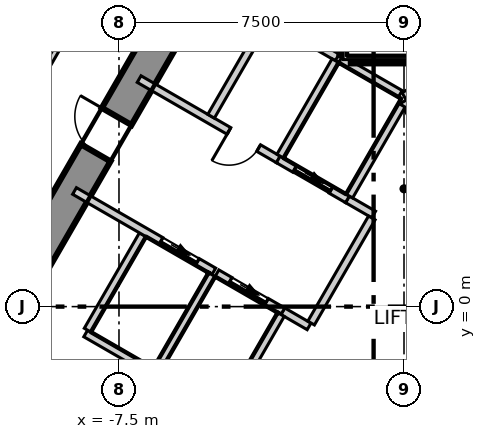
"""IFC4 building model, lengths in metres.
Left out: names, types, materials, properties, quantities, classifications, styles, units other than length and angle.
Written with IfcOpenShell. Run it as: python <this file> out.ifc"""

import sys

from ifc_helpers import new_model, si_unit, direction, frame, frame_2d, origin, place, context, subcontext, project, spatial, polyline, rectangle, outline, extrude, element, fill, save


model = new_model("IFC4")
c1 = context("Model", 3, precision=1e-05, world=origin(), true_north=direction((0.0, 1.0)))
c2 = subcontext(c1, "Body", "Model", "MODEL_VIEW")
j1 = project(units=[si_unit("LENGTHUNIT", "METRE"), si_unit("PLANEANGLEUNIT", "RADIAN")], contexts=[c1])
p1 = place(None, origin())
s1 = spatial("IfcSite", under=j1, at=p1, CompositionType="ELEMENT")
p2 = place(p1, origin())
s2 = spatial("IfcBuilding", under=s1, at=p2, CompositionType="ELEMENT")
p3 = place(p2, frame((0.0, 0.0, 71.3)))
s3 = spatial("IfcBuildingStorey", under=s2, at=p3, CompositionType="ELEMENT", Elevation=71.3)
p4 = place(p3, frame((-1.645, 15.25, -0.3), z_axis=(0.0, 0.0, 1.0), x_axis=(-0.500026485275, -0.866010111964, 0.0)))
e1 = element("IfcWall", 1, at=p4, inside=s3, PredefinedType="SHEAR", context=c2, shape_type="SweptSolid", body=[
    extrude(outline(polyline([(-0.26, -0.45), (1.685, -0.45), (3.63, -0.45), (5.576, -0.45), (7.521, -0.45), (9.466, -0.449), (11.411, -0.449), (13.357, -0.449), (15.302, -0.449), (17.247, -0.449), (19.192, -0.449), (21.138, -0.449), (23.083, -0.449), (25.028, -0.449), (24.509, 0.45), (22.644, 0.45), (20.778, 0.45), (18.913, 0.45), (17.048, 0.45), (15.182, 0.449), (13.317, 0.449), (11.452, 0.449), (9.587, 0.449), (7.721, 0.449), (5.856, 0.449), (3.991, 0.449), (2.125, 0.449), (0.26, 0.449), (-0.26, -0.45)])), origin(), (0.0, 0.0, 1.0), 4.0),
])
p5 = place(p4, frame((11.834, 0.0, 0.3)))
e2 = element("IfcOpeningElement", 2, at=p5, cuts=e1, PredefinedType="OPENING", context=c2, shape_type="SweptSolid", body=[
    extrude(rectangle(XDim=1.1, YDim=2.1, at=frame_2d((0.55, 1.05))), frame((0.0, 0.46, 0.0), z_axis=(0.0, -1.0, 0.0), x_axis=(1.0, 0.0, 0.0)), (0.0, 0.0, 1.0), 0.92),
])
p6 = place(p4, frame((8.13, 0.0, 0.3)))
e3 = element("IfcOpeningElement", 3, at=p6, cuts=e1, PredefinedType="OPENING", context=c2, shape_type="SweptSolid", body=[
    extrude(rectangle(XDim=0.9, YDim=2.1, at=frame_2d((0.45, 1.05))), frame((0.0, 0.46, 0.0), z_axis=(0.0, -1.0, 0.0), x_axis=(1.0, 0.0, 0.0)), (0.0, 0.0, 1.0), 0.92),
])
p7 = place(p4, frame((3.255, 0.0, 0.3)))
e4 = element("IfcOpeningElement", 4, at=p7, cuts=e1, PredefinedType="OPENING", context=c2, shape_type="SweptSolid", body=[
    extrude(rectangle(XDim=0.9, YDim=2.1, at=frame_2d((0.45, 1.05))), frame((0.0, 0.46, 0.0), z_axis=(0.0, -1.0, 0.0), x_axis=(1.0, 0.0, 0.0)), (0.0, 0.0, 1.0), 0.92),
])
p8 = place(p3, frame((-3.326, 37.084, 0.0), z_axis=(0.0, 0.0, 1.0), x_axis=(-0.500000131003, -0.86602532815, 0.0)))
e5 = element("IfcWall", 5, at=p8, inside=s3, PredefinedType="ELEMENTEDWALL", context=c2, shape_type="SweptSolid", body=[
    extrude(rectangle(XDim=60.886, YDim=0.2, at=frame_2d((30.443, 0.0))), origin(), (0.0, 0.0, 1.0), 3.7),
])
p9 = place(p8, frame((2.146, 0.0, 0.9)))
e6 = element("IfcOpeningElement", 6, at=p9, cuts=e5, PredefinedType="OPENING", context=c2, shape_type="SweptSolid", body=[
    extrude(rectangle(XDim=5.6, YDim=2.5, at=frame_2d((2.8, 1.25))), frame((0.0, 0.11, 0.0), z_axis=(0.0, -1.0, 0.0), x_axis=(1.0, 0.0, 0.0)), (0.0, 0.0, 1.0), 0.22),
])
p10 = place(p8, frame((9.434, 0.0, 0.9)))
e7 = element("IfcOpeningElement", 7, at=p10, cuts=e5, PredefinedType="OPENING", context=c2, shape_type="SweptSolid", body=[
    extrude(rectangle(XDim=5.6, YDim=2.5, at=frame_2d((2.8, 1.25))), frame((0.0, 0.11, 0.0), z_axis=(0.0, -1.0, 0.0), x_axis=(1.0, 0.0, 0.0)), (0.0, 0.0, 1.0), 0.22),
])
p11 = place(p8, frame((16.721, 0.0, 0.9)))
e8 = element("IfcOpeningElement", 8, at=p11, cuts=e5, PredefinedType="OPENING", context=c2, shape_type="SweptSolid", body=[
    extrude(rectangle(XDim=5.6, YDim=2.5, at=frame_2d((2.8, 1.25))), frame((0.0, 0.11, 0.0), z_axis=(0.0, -1.0, 0.0), x_axis=(1.0, 0.0, 0.0)), (0.0, 0.0, 1.0), 0.22),
])
p12 = place(p8, frame((24.009, 0.0, 0.9)))
e9 = element("IfcOpeningElement", 9, at=p12, cuts=e5, PredefinedType="OPENING", context=c2, shape_type="SweptSolid", body=[
    extrude(rectangle(XDim=5.6, YDim=2.5, at=frame_2d((2.8, 1.25))), frame((0.0, 0.11, 0.0), z_axis=(0.0, -1.0, 0.0), x_axis=(1.0, 0.0, 0.0)), (0.0, 0.0, 1.0), 0.22),
])
p13 = place(p8, frame((31.297, 0.0, 0.9)))
e10 = element("IfcOpeningElement", 10, at=p13, cuts=e5, PredefinedType="OPENING", context=c2, shape_type="SweptSolid", body=[
    extrude(rectangle(XDim=5.6, YDim=2.5, at=frame_2d((2.8, 1.25))), frame((0.0, 0.11, 0.0), z_axis=(0.0, -1.0, 0.0), x_axis=(1.0, 0.0, 0.0)), (0.0, 0.0, 1.0), 0.22),
])
p14 = place(p8, frame((38.584, 0.0, 0.9)))
e11 = element("IfcOpeningElement", 11, at=p14, cuts=e5, PredefinedType="OPENING", context=c2, shape_type="SweptSolid", body=[
    extrude(rectangle(XDim=5.6, YDim=2.5, at=frame_2d((2.8, 1.25))), frame((0.0, 0.11, 0.0), z_axis=(0.0, -1.0, 0.0), x_axis=(1.0, 0.0, 0.0)), (0.0, 0.0, 1.0), 0.22),
])
p15 = place(p8, frame((45.872, 0.0, 0.9)))
e12 = element("IfcOpeningElement", 12, at=p15, cuts=e5, PredefinedType="OPENING", context=c2, shape_type="SweptSolid", body=[
    extrude(rectangle(XDim=5.6, YDim=2.5, at=frame_2d((2.8, 1.25))), frame((0.0, 0.11, 0.0), z_axis=(0.0, -1.0, 0.0), x_axis=(1.0, 0.0, 0.0)), (0.0, 0.0, 1.0), 0.22),
])
p16 = place(p8, frame((53.159, 0.0, 0.9)))
e13 = element("IfcOpeningElement", 13, at=p16, cuts=e5, PredefinedType="OPENING", context=c2, shape_type="SweptSolid", body=[
    extrude(rectangle(XDim=5.6, YDim=2.5, at=frame_2d((2.8, 1.25))), frame((0.0, 0.11, 0.0), z_axis=(0.0, -1.0, 0.0), x_axis=(1.0, 0.0, 0.0)), (0.0, 0.0, 1.0), 0.22),
])
p17 = place(p3, frame((-19.497, -11.17, 0.0), z_axis=(0.0, 0.0, 1.0), x_axis=(0.499998854553, 0.866026065108, 0.0)))
e14 = element("IfcWall", 14, at=p17, inside=s3, PredefinedType="PARTITIONING", context=c2, shape_type="SweptSolid", body=[
    extrude(rectangle(XDim=38.994, YDim=0.15, at=frame_2d((19.497, 0.0))), origin(), (0.0, 0.0, 1.0), 3.7),
])
p18 = place(p17, frame((35.944, 0.0, 0.0)))
e15 = element("IfcOpeningElement", 15, at=p18, cuts=e14, PredefinedType="OPENING", context=c2, shape_type="SweptSolid", body=[
    extrude(rectangle(XDim=1.1, YDim=2.1, at=frame_2d((0.55, 1.05))), frame((0.0, 0.085, 0.0), z_axis=(0.0, -1.0, 0.0), x_axis=(1.0, 0.0, 0.0)), (0.0, 0.0, 1.0), 0.17),
])
p19 = place(p17, frame((26.148, 0.0, 0.0)))
e16 = element("IfcOpeningElement", 16, at=p19, cuts=e14, PredefinedType="OPENING", context=c2, shape_type="SweptSolid", body=[
    extrude(rectangle(XDim=1.1, YDim=2.1, at=frame_2d((0.55, 1.05))), frame((0.0, 0.085, 0.0), z_axis=(0.0, -1.0, 0.0), x_axis=(1.0, 0.0, 0.0)), (0.0, 0.0, 1.0), 0.17),
])
p20 = place(p17, frame((8.572, 0.0, 0.0)))
e17 = element("IfcOpeningElement", 17, at=p20, cuts=e14, PredefinedType="OPENING", context=c2, shape_type="SweptSolid", body=[
    extrude(rectangle(XDim=1.1, YDim=2.1, at=frame_2d((0.55, 1.05))), frame((0.0, 0.085, 0.0), z_axis=(0.0, -1.0, 0.0), x_axis=(1.0, 0.0, 0.0)), (0.0, 0.0, 1.0), 0.17),
])
p21 = place(p17, frame((17.172, 0.0, 0.0)))
e18 = element("IfcOpeningElement", 18, at=p21, cuts=e14, PredefinedType="OPENING", context=c2, shape_type="SweptSolid", body=[
    extrude(rectangle(XDim=0.9, YDim=2.1, at=frame_2d((0.45, 1.05))), frame((0.0, 0.085, 0.0), z_axis=(0.0, -1.0, 0.0), x_axis=(1.0, 0.0, 0.0)), (0.0, 0.0, 1.0), 0.17),
])
p22 = place(p17, frame((14.172, 0.0, 0.0)))
e19 = element("IfcOpeningElement", 19, at=p22, cuts=e14, PredefinedType="OPENING", context=c2, shape_type="SweptSolid", body=[
    extrude(rectangle(XDim=0.9, YDim=2.1, at=frame_2d((0.45, 1.05))), frame((0.0, 0.085, 0.0), z_axis=(0.0, -1.0, 0.0), x_axis=(1.0, 0.0, 0.0)), (0.0, 0.0, 1.0), 0.17),
])
p23 = place(p17, frame((1.797, 0.0, 0.0)))
e20 = element("IfcOpeningElement", 20, at=p23, cuts=e14, PredefinedType="OPENING", context=c2, shape_type="SweptSolid", body=[
    extrude(rectangle(XDim=1.1, YDim=2.1, at=frame_2d((0.55, 1.05))), frame((0.0, 0.085, 0.0), z_axis=(0.0, -1.0, 0.0), x_axis=(1.0, 0.0, 0.0)), (0.0, 0.0, 1.0), 0.17),
])
p24 = place(p3, frame((0.075, 22.47, 0.0), z_axis=(0.0, 0.0, 1.0), x_axis=(0.500002280369, -0.866024087209, 0.0)))
e21 = element("IfcWall", 21, at=p24, inside=s3, PredefinedType="PARTITIONING", context=c2, shape_type="SweptSolid", body=[
    extrude(rectangle(XDim=38.844, YDim=0.15, at=frame_2d((19.422, 0.0))), origin(), (0.0, 0.0, 1.0), 3.7),
])
p25 = place(p24, frame((35.944, 0.0, 0.0)))
e22 = element("IfcOpeningElement", 22, at=p25, cuts=e21, PredefinedType="OPENING", context=c2, shape_type="SweptSolid", body=[
    extrude(rectangle(XDim=1.1, YDim=2.1, at=frame_2d((0.55, 1.05))), frame((0.0, 0.085, 0.0), z_axis=(0.0, -1.0, 0.0), x_axis=(1.0, 0.0, 0.0)), (0.0, 0.0, 1.0), 0.17),
])
p26 = place(p24, frame((29.848, 0.0, 0.0)))
e23 = element("IfcOpeningElement", 23, at=p26, cuts=e21, PredefinedType="OPENING", context=c2, shape_type="SweptSolid", body=[
    extrude(rectangle(XDim=1.0, YDim=2.1, at=frame_2d((0.5, 1.05))), frame((0.0, 0.085, 0.0), z_axis=(0.0, -1.0, 0.0), x_axis=(1.0, 0.0, 0.0)), (0.0, 0.0, 1.0), 0.17),
])
p27 = place(p24, frame((14.46, 0.0, 0.0)))
e24 = element("IfcOpeningElement", 24, at=p27, cuts=e21, PredefinedType="OPENING", context=c2, shape_type="SweptSolid", body=[
    extrude(rectangle(XDim=1.1, YDim=2.1, at=frame_2d((0.55, 1.05))), frame((0.0, 0.085, 0.0), z_axis=(0.0, -1.0, 0.0), x_axis=(1.0, 0.0, 0.0)), (0.0, 0.0, 1.0), 0.17),
])
p28 = place(p24, frame((24.66, 0.0, 0.0)))
e25 = element("IfcOpeningElement", 25, at=p28, cuts=e21, PredefinedType="OPENING", context=c2, shape_type="SweptSolid", body=[
    extrude(rectangle(XDim=0.9, YDim=2.1, at=frame_2d((0.45, 1.05))), frame((0.0, 0.085, 0.0), z_axis=(0.0, -1.0, 0.0), x_axis=(1.0, 0.0, 0.0)), (0.0, 0.0, 1.0), 0.17),
])
p29 = place(p24, frame((21.46, 0.0, 0.0)))
e26 = element("IfcOpeningElement", 26, at=p29, cuts=e21, PredefinedType="OPENING", context=c2, shape_type="SweptSolid", body=[
    extrude(rectangle(XDim=0.9, YDim=2.1, at=frame_2d((0.45, 1.05))), frame((0.0, 0.085, 0.0), z_axis=(0.0, -1.0, 0.0), x_axis=(1.0, 0.0, 0.0)), (0.0, 0.0, 1.0), 0.17),
])
p30 = place(p24, frame((18.66, 0.0, 0.0)))
e27 = element("IfcOpeningElement", 27, at=p30, cuts=e21, PredefinedType="OPENING", context=c2, shape_type="SweptSolid", body=[
    extrude(rectangle(XDim=1.0, YDim=2.1, at=frame_2d((0.5, 1.05))), frame((0.0, 0.085, 0.0), z_axis=(0.0, -1.0, 0.0), x_axis=(1.0, 0.0, 0.0)), (0.0, 0.0, 1.0), 0.17),
])
p31 = place(p24, frame((6.785, 0.0, 0.0)))
e28 = element("IfcOpeningElement", 28, at=p31, cuts=e21, PredefinedType="OPENING", context=c2, shape_type="SweptSolid", body=[
    extrude(rectangle(XDim=1.0, YDim=2.1, at=frame_2d((0.5, 1.05))), frame((0.0, 0.085, 0.0), z_axis=(0.0, -1.0, 0.0), x_axis=(1.0, 0.0, 0.0)), (0.0, 0.0, 1.0), 0.17),
])
p32 = place(p24, frame((10.485, 0.0, 0.0)))
e29 = element("IfcOpeningElement", 29, at=p32, cuts=e21, PredefinedType="OPENING", context=c2, shape_type="SweptSolid", body=[
    extrude(rectangle(XDim=0.9, YDim=2.1, at=frame_2d((0.45, 1.05))), frame((0.0, 0.085, 0.0), z_axis=(0.0, -1.0, 0.0), x_axis=(1.0, 0.0, 0.0)), (0.0, 0.0, 1.0), 0.17),
])
p33 = place(p24, frame((1.796, 0.0, 0.0)))
e30 = element("IfcOpeningElement", 30, at=p33, cuts=e21, PredefinedType="OPENING", context=c2, shape_type="SweptSolid", body=[
    extrude(rectangle(XDim=1.1, YDim=2.1, at=frame_2d((0.55, 1.05))), frame((0.0, 0.085, 0.0), z_axis=(0.0, -1.0, 0.0), x_axis=(1.0, 0.0, 0.0)), (0.0, 0.0, 1.0), 0.17),
])
p34 = place(p3, frame((-8.376, -0.707, 0.0), z_axis=(0.0, 0.0, 1.0), x_axis=(0.866067520717, -0.499927044236, 0.0)))
e31 = element("IfcWall", 31, at=p34, inside=s3, PredefinedType="SOLIDWALL", context=c2, shape_type="SweptSolid", body=[
    extrude(rectangle(XDim=2.1, YDim=0.2, at=frame_2d((1.05, 0.0))), origin(), (0.0, 0.0, 1.0), 3.7),
])
p35 = place(p3, frame((-8.326, -0.62, 0.0), z_axis=(0.0, 0.0, 1.0), x_axis=(0.500023687443, 0.866011727401, 0.0)))
e32 = element("IfcWall", 32, at=p35, inside=s3, PredefinedType="SOLIDWALL", context=c2, shape_type="SweptSolid", body=[
    extrude(rectangle(XDim=2.9, YDim=0.2, at=frame_2d((1.45, 0.0))), origin(), (0.0, 0.0, 1.0), 3.7),
])
p36 = place(p3, frame((-0.002, 5.541, 0.0), z_axis=(0.0, 0.0, 1.0), x_axis=(0.86600155993, 0.500041296494, 0.0)))
e33 = element("IfcWall", 33, at=p36, inside=s3, PredefinedType="SOLIDWALL", context=c2, shape_type="SweptSolid", body=[
    extrude(rectangle(XDim=4.132, YDim=0.2, at=frame_2d((2.066, 0.0))), origin(), (0.0, 0.0, 1.0), 3.7),
])
p37 = place(p3, frame((0.0, 5.4, 0.0), z_axis=(0.0, 0.0, 1.0), x_axis=(0.500103862429, -0.865965430478, 0.0)))
e34 = element("IfcWall", 34, at=p37, inside=s3, PredefinedType="SOLIDWALL", context=c2, shape_type="SweptSolid", body=[
    extrude(rectangle(XDim=2.973, YDim=0.2, at=frame_2d((1.487, 0.0))), origin(), (0.0, 0.0, 1.0), 3.7),
])
p38 = place(p37, frame((0.937, 0.0, 0.0)))
e35 = element("IfcOpeningElement", 35, at=p38, cuts=e34, PredefinedType="OPENING", context=c2, shape_type="SweptSolid", body=[
    extrude(rectangle(XDim=1.1, YDim=2.1, at=frame_2d((0.55, 1.05))), frame((0.0, 0.11, 0.0), z_axis=(0.0, -1.0, 0.0), x_axis=(1.0, 0.0, 0.0)), (0.0, 0.0, 1.0), 0.22),
])
p39 = place(p3, frame((-8.67, 3.043, 0.0), z_axis=(0.0, 0.0, 1.0), x_axis=(0.866029956157, -0.499992114976, 0.0)))
e36 = element("IfcWall", 36, at=p39, inside=s3, PredefinedType="SOLIDWALL", context=c2, shape_type="SweptSolid", body=[
    extrude(rectangle(XDim=4.232, YDim=0.2, at=frame_2d((2.116, 0.0))), origin(), (0.0, 0.0, 1.0), 3.7),
])
p40 = place(p39, frame((2.63, 0.0, 0.0)))
e37 = element("IfcOpeningElement", 37, at=p40, cuts=e36, PredefinedType="OPENING", context=c2, shape_type="SweptSolid", body=[
    extrude(rectangle(XDim=1.1, YDim=2.1, at=frame_2d((0.55, 1.05))), frame((0.0, 0.11, 0.0), z_axis=(0.0, -1.0, 0.0), x_axis=(1.0, 0.0, 0.0)), (0.0, 0.0, 1.0), 0.22),
])
p41 = place(p3, frame((-3.188, -0.122, 0.0), z_axis=(0.0, 0.0, 1.0), x_axis=(0.865705793592, -0.50055317294, 0.0)))
e38 = element("IfcWall", 38, at=p41, inside=s3, PredefinedType="SOLIDWALL", context=c2, shape_type="SweptSolid", body=[
    extrude(rectangle(XDim=0.797, YDim=0.2, at=frame_2d((0.398, 0.0))), origin(), (0.0, 0.0, 1.0), 3.7),
])
p42 = place(p3, frame((-6.97, 5.987, 0.0), z_axis=(0.0, 0.0, 1.0), x_axis=(0.866029956157, -0.499992114976, 0.0)))
e39 = element("IfcWall", 39, at=p42, inside=s3, PredefinedType="SOLIDWALL", context=c2, shape_type="SweptSolid", body=[
    extrude(rectangle(XDim=4.232, YDim=0.2, at=frame_2d((2.116, 0.0))), origin(), (0.0, 0.0, 1.0), 3.7),
])
p43 = place(p42, frame((2.73, 0.0, 0.0)))
e40 = element("IfcOpeningElement", 40, at=p43, cuts=e39, PredefinedType="OPENING", context=c2, shape_type="SweptSolid", body=[
    extrude(rectangle(XDim=0.9, YDim=2.1, at=frame_2d((0.45, 1.05))), frame((0.0, 0.11, 0.0), z_axis=(0.0, -1.0, 0.0), x_axis=(1.0, 0.0, 0.0)), (0.0, 0.0, 1.0), 0.22),
])
p44 = place(p3, frame((-1.488, 2.822, 0.0), z_axis=(0.0, 0.0, 1.0), x_axis=(0.866236612152, -0.499633997809, 0.0)))
e41 = element("IfcWall", 41, at=p44, inside=s3, PredefinedType="SOLIDWALL", context=c2, shape_type="SweptSolid", body=[
    extrude(rectangle(XDim=0.796, YDim=0.2, at=frame_2d((0.398, 0.0))), origin(), (0.0, 0.0, 1.0), 3.7),
])
p45 = place(p3, frame((-5.076, 5.009, 0.0), z_axis=(0.0, 0.0, 1.0), x_axis=(0.500085598968, 0.865975977556, 0.0)))
e42 = element("IfcWall", 42, at=p45, inside=s3, PredefinedType="SOLIDWALL", context=c2, shape_type="SweptSolid", body=[
    extrude(rectangle(XDim=2.987, YDim=0.2, at=frame_2d((1.494, 0.0))), origin(), (0.0, 0.0, 1.0), 3.7),
])
p46 = place(p3, frame((-3.489, 7.557, 0.0), z_axis=(0.0, 0.0, 1.0), x_axis=(0.866010750942, -0.50002537861, 0.0)))
e43 = element("IfcWall", 43, at=p46, inside=s3, PredefinedType="SOLIDWALL", context=c2, shape_type="SweptSolid", body=[
    extrude(rectangle(XDim=2.0, YDim=0.2, at=frame_2d((1.0, 0.0))), origin(), (0.0, 0.0, 1.0), 3.7),
])
p47 = place(p3, frame((-2.444, -0.433, 0.0), z_axis=(0.0, 0.0, 1.0), x_axis=(0.500035624827, 0.866004834804, 0.0)))
e44 = element("IfcWall", 44, at=p47, inside=s3, PredefinedType="SOLIDWALL", context=c2, shape_type="SweptSolid", body=[
    extrude(rectangle(XDim=3.194, YDim=0.2, at=frame_2d((1.597, 0.0))), origin(), (0.0, 0.0, 1.0), 3.7),
])
p48 = place(p3, frame((-6.507, -1.67, 0.0), z_axis=(0.0, 0.0, 1.0), x_axis=(0.50012328804, 0.865954211699, 0.0)))
e45 = element("IfcWall", 45, at=p48, inside=s3, PredefinedType="SOLIDWALL", context=c2, shape_type="SweptSolid", body=[
    extrude(rectangle(XDim=2.9, YDim=0.2, at=frame_2d((1.45, 0.0))), origin(), (0.0, 0.0, 1.0), 3.7),
])
p49 = place(p3, frame((-4.922, 0.879, 0.0), z_axis=(0.0, 0.0, 1.0), x_axis=(0.866073918653, -0.499915960366, 0.0)))
e46 = element("IfcWall", 46, at=p49, inside=s3, PredefinedType="SOLIDWALL", context=c2, shape_type="SweptSolid", body=[
    extrude(rectangle(XDim=2.002, YDim=0.2, at=frame_2d((1.001, 0.0))), origin(), (0.0, 0.0, 1.0), 3.7),
])
p50 = place(p49, frame((0.402, 0.0, 0.0)))
e47 = element("IfcOpeningElement", 47, at=p50, cuts=e46, PredefinedType="OPENING", context=c2, shape_type="SweptSolid", body=[
    extrude(rectangle(XDim=1.1, YDim=2.1, at=frame_2d((0.55, 1.05))), frame((0.0, 0.11, 0.0), z_axis=(0.0, -1.0, 0.0), x_axis=(1.0, 0.0, 0.0)), (0.0, 0.0, 1.0), 0.22),
])
p51 = place(p3, frame((-4.619, -2.6, 0.0), z_axis=(0.0, 0.0, 1.0), x_axis=(0.50009492287, 0.865970593103, 0.0)))
e48 = element("IfcWall", 48, at=p51, inside=s3, PredefinedType="SOLIDWALL", context=c2, shape_type="SweptSolid", body=[
    extrude(rectangle(XDim=2.761, YDim=0.2, at=frame_2d((1.381, 0.0))), origin(), (0.0, 0.0, 1.0), 3.7),
])
p52 = place(p3, frame((-3.309, 3.873, 0.0), z_axis=(0.0, 0.0, 1.0), x_axis=(0.866098583652, -0.499873227325, 0.0)))
e49 = element("IfcWall", 49, at=p52, inside=s3, PredefinedType="SOLIDWALL", context=c2, shape_type="SweptSolid", body=[
    extrude(rectangle(XDim=2.103, YDim=0.2, at=frame_2d((1.051, 0.0))), origin(), (0.0, 0.0, 1.0), 3.7),
])
p53 = place(p52, frame((0.502, 0.0, 0.0)))
e50 = element("IfcOpeningElement", 50, at=p53, cuts=e49, PredefinedType="OPENING", context=c2, shape_type="SweptSolid", body=[
    extrude(rectangle(XDim=1.1, YDim=2.1, at=frame_2d((0.55, 1.05))), frame((0.0, 0.11, 0.0), z_axis=(0.0, -1.0, 0.0), x_axis=(1.0, 0.0, 0.0)), (0.0, 0.0, 1.0), 0.22),
])
p54 = place(p3, frame((-3.257, 3.959, 0.0), z_axis=(0.0, 0.0, 1.0), x_axis=(0.50012328804, 0.865954211699, 0.0)))
e51 = element("IfcWall", 51, at=p54, inside=s3, PredefinedType="SOLIDWALL", context=c2, shape_type="SweptSolid", body=[
    extrude(rectangle(XDim=2.9, YDim=0.2, at=frame_2d((1.45, 0.0))), origin(), (0.0, 0.0, 1.0), 3.7),
])
p55 = place(p3, frame((-1.67, 6.507, 0.0), z_axis=(0.0, 0.0, 1.0), x_axis=(0.865941441609, -0.500145398563, 0.0)))
e52 = element("IfcWall", 52, at=p55, inside=s3, PredefinedType="SOLIDWALL", context=c2, shape_type="SweptSolid", body=[
    extrude(rectangle(XDim=1.815, YDim=0.2, at=frame_2d((0.908, 0.0))), origin(), (0.0, 0.0, 1.0), 3.7),
])
p56 = place(p3, frame((-1.438, 2.909, 0.0), z_axis=(0.0, 0.0, 1.0), x_axis=(0.499829630636, 0.866123744241, 0.0)))
e53 = element("IfcWall", 53, at=p56, inside=s3, PredefinedType="SOLIDWALL", context=c2, shape_type="SweptSolid", body=[
    extrude(rectangle(XDim=2.761, YDim=0.2, at=frame_2d((1.38, 0.0))), origin(), (0.0, 0.0, 1.0), 3.7),
])
p57 = place(p3, frame((-1.4, 6.5, 0.0), z_axis=(0.0, 0.0, 1.0), x_axis=(1.0, 0.0, 0.0)))
e54 = element("IfcWall", 54, at=p57, inside=s3, PredefinedType="SOLIDWALL", context=c2, shape_type="SweptSolid", body=[
    extrude(rectangle(XDim=2.8, YDim=0.2, at=frame_2d((1.4, 0.0))), origin(), (0.0, 0.0, 1.0), 3.7),
])
p58 = place(p3, frame((-1.6, 6.615, 0.0), z_axis=(0.0, 0.0, 1.0), x_axis=(0.0, 1.0, 0.0)))
e55 = element("IfcWall", 55, at=p58, inside=s3, PredefinedType="SOLIDWALL", context=c2, shape_type="SweptSolid", body=[
    extrude(rectangle(XDim=8.615, YDim=0.2, at=frame_2d((4.308, 0.0))), origin(), (0.0, 0.0, 1.0), 3.7),
])
p59 = place(p50, origin())
e56 = element("IfcDoor", 56, at=p59, inside=s3, OperationType="SLIDING_TO_LEFT", PredefinedType="DOOR", context=c2, shape_type="SweptSolid", body=[
    extrude(rectangle(XDim=1.1, YDim=2.1, at=frame_2d((0.55, 1.05))), frame((0.0, 0.025, 0.0), z_axis=(0.0, -1.0, 0.0), x_axis=(1.0, 0.0, 0.0)), (0.0, 0.0, 1.0), 0.05),
])
fill(e47, e56)
p60 = place(p53, origin())
e57 = element("IfcDoor", 57, at=p60, inside=s3, OperationType="SLIDING_TO_LEFT", PredefinedType="DOOR", context=c2, shape_type="SweptSolid", body=[
    extrude(rectangle(XDim=1.1, YDim=2.1, at=frame_2d((0.55, 1.05))), frame((0.0, 0.025, 0.0), z_axis=(0.0, -1.0, 0.0), x_axis=(1.0, 0.0, 0.0)), (0.0, 0.0, 1.0), 0.05),
])
fill(e50, e57)
p61 = place(p40, origin())
e58 = element("IfcDoor", 58, at=p61, inside=s3, OperationType="SLIDING_TO_LEFT", PredefinedType="DOOR", context=c2, shape_type="SweptSolid", body=[
    extrude(rectangle(XDim=1.1, YDim=2.1, at=frame_2d((0.55, 1.05))), frame((0.0, 0.025, 0.0), z_axis=(0.0, -1.0, 0.0), x_axis=(1.0, 0.0, 0.0)), (0.0, 0.0, 1.0), 0.05),
])
fill(e37, e58)
p62 = place(p43, origin())
e59 = element("IfcDoor", 59, at=p62, inside=s3, OperationType="SINGLE_SWING_LEFT", PredefinedType="DOOR", context=c2, shape_type="SweptSolid", body=[
    extrude(rectangle(XDim=0.9, YDim=2.1, at=frame_2d((0.45, 1.05))), frame((0.0, 0.025, 0.0), z_axis=(0.0, -1.0, 0.0), x_axis=(1.0, 0.0, 0.0)), (0.0, 0.0, 1.0), 0.05),
])
fill(e40, e59)
p63 = place(p5, origin())
e60 = element("IfcDoor", 60, at=p63, inside=s3, OperationType="SINGLE_SWING_LEFT", PredefinedType="DOOR", context=c2, shape_type="SweptSolid", body=[
    extrude(rectangle(XDim=1.1, YDim=2.1, at=frame_2d((0.55, 1.05))), frame((0.0, 0.025, 0.0), z_axis=(0.0, -1.0, 0.0), x_axis=(1.0, 0.0, 0.0)), (0.0, 0.0, 1.0), 0.05),
])
fill(e2, e60)
save(model, sys.argv[1])
